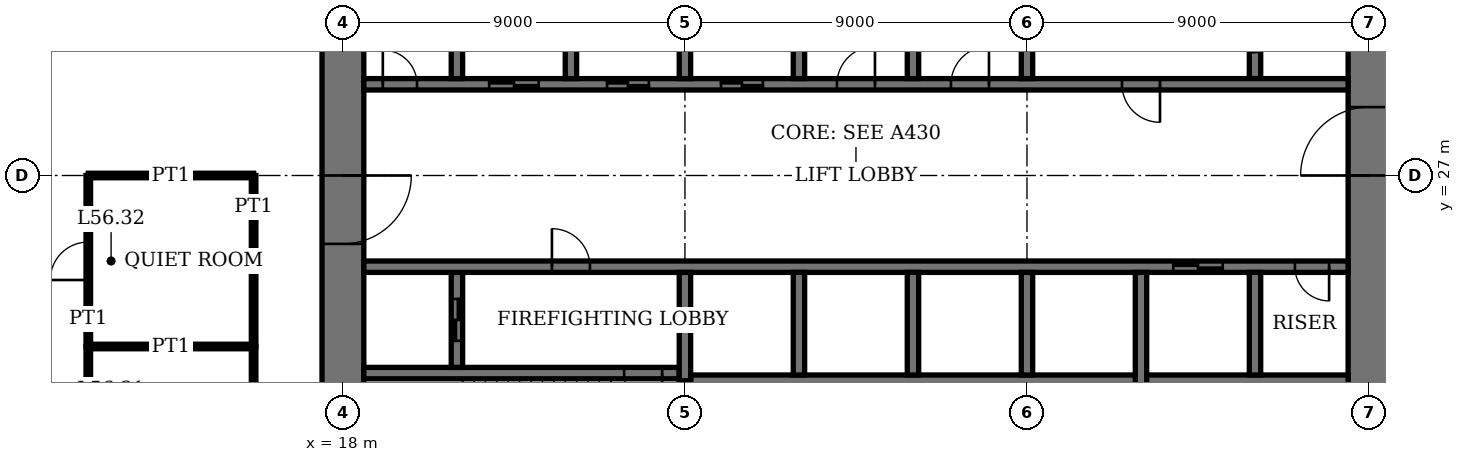
"""IFC4 building model, lengths in metres.
Left out: names, types, materials, properties, quantities, classifications, styles, units other than length and angle.
Written with IfcOpenShell. Run it as: python <this file> out.ifc"""

import sys

from ifc_helpers import new_model, si_unit, direction, frame, frame_2d, origin, place, context, subcontext, project, spatial, rectangle, extrude, element, fill, save


model = new_model("IFC4")
c1 = context("Model", 3, precision=1e-05, world=origin(), true_north=direction((0.0, 1.0)))
c2 = subcontext(c1, "Body", "Model", "MODEL_VIEW")
j1 = project(units=[si_unit("LENGTHUNIT", "METRE"), si_unit("PLANEANGLEUNIT", "RADIAN")], contexts=[c1])
p1 = place(None, origin())
s1 = spatial("IfcSite", under=j1, at=p1, CompositionType="ELEMENT")
p2 = place(p1, origin())
s2 = spatial("IfcBuilding", under=s1, at=p2, CompositionType="ELEMENT")
p3 = place(p2, frame((0.0, 0.0, 230.2)))
s3 = spatial("IfcBuildingStorey", under=s2, at=p3, CompositionType="ELEMENT", Elevation=230.2)
p4 = place(p3, frame((18.0, 35.45, 0.0), z_axis=(0.0, 0.0, 1.0), x_axis=(0.0, -1.0, 0.0)))
e1 = element("IfcWall", 1, at=p4, inside=s3, PredefinedType="SHEAR", context=c2, shape_type="SweptSolid", body=[
    extrude(rectangle(XDim=16.9, YDim=1.1, at=frame_2d((8.45, 0.0))), origin(), (0.0, 0.0, 1.0), 4.2),
])
p5 = place(p4, frame((8.45, 0.0, 0.0)))
e2 = element("IfcOpeningElement", 2, at=p5, cuts=e1, PredefinedType="OPENING", context=c2, shape_type="SweptSolid", body=[
    extrude(rectangle(XDim=1.8, YDim=2.4, at=frame_2d((0.9, 1.2))), frame((0.0, 0.56, 0.0), z_axis=(0.0, -1.0, 0.0), x_axis=(1.0, 0.0, 0.0)), (0.0, 0.0, 1.0), 1.12),
])
p6 = place(p3, frame((45.0, 18.55, 0.0), z_axis=(0.0, 0.0, 1.0), x_axis=(0.0, 1.0, 0.0)))
e3 = element("IfcWall", 3, at=p6, inside=s3, PredefinedType="SHEAR", context=c2, shape_type="SweptSolid", body=[
    extrude(rectangle(XDim=16.9, YDim=1.1, at=frame_2d((8.45, 0.0))), origin(), (0.0, 0.0, 1.0), 4.2),
])
p7 = place(p6, frame((8.45, 0.0, 0.0)))
e4 = element("IfcOpeningElement", 4, at=p7, cuts=e3, PredefinedType="OPENING", context=c2, shape_type="SweptSolid", body=[
    extrude(rectangle(XDim=1.8, YDim=2.4, at=frame_2d((0.9, 1.2))), frame((0.0, 0.56, 0.0), z_axis=(0.0, -1.0, 0.0), x_axis=(1.0, 0.0, 0.0)), (0.0, 0.0, 1.0), 1.12),
])
p8 = place(p3, frame((18.55, 21.8, 0.0), z_axis=(0.0, 0.0, 1.0), x_axis=(1.0, 0.0, 0.0)))
e5 = element("IfcWall", 5, at=p8, inside=s3, PredefinedType="SHEAR", context=c2, shape_type="SweptSolid", body=[
    extrude(rectangle(XDim=8.3, YDim=0.3, at=frame_2d((4.15, 0.0))), origin(), (0.0, 0.0, 1.0), 4.2),
])
p9 = place(p8, frame((6.85, 0.0, 0.0)))
e6 = element("IfcOpeningElement", 6, at=p9, cuts=e5, PredefinedType="OPENING", context=c2, shape_type="SweptSolid", body=[
    extrude(rectangle(XDim=1.0, YDim=2.4, at=frame_2d((0.5, 1.2))), frame((0.0, 0.16, 0.0), z_axis=(0.0, -1.0, 0.0), x_axis=(1.0, 0.0, 0.0)), (0.0, 0.0, 1.0), 0.32),
])
p10 = place(p3, frame((27.0, 18.55, 0.0), z_axis=(0.0, 0.0, 1.0), x_axis=(0.0, 1.0, 0.0)))
e7 = element("IfcWall", 7, at=p10, inside=s3, PredefinedType="SHEAR", context=c2, shape_type="SweptSolid", body=[
    extrude(rectangle(XDim=3.05, YDim=0.3, at=frame_2d((1.525, 0.0))), origin(), (0.0, 0.0, 1.0), 4.2),
])
p11 = place(p3, frame((21.0, 21.95, 0.0), z_axis=(0.0, 0.0, 1.0), x_axis=(0.0, 1.0, 0.0)))
e8 = element("IfcWall", 8, at=p11, inside=s3, PredefinedType="SHEAR", context=c2, shape_type="SweptSolid", body=[
    extrude(rectangle(XDim=2.5, YDim=0.3, at=frame_2d((1.25, 0.0))), origin(), (0.0, 0.0, 1.0), 4.2),
])
p12 = place(p11, frame((0.7, 0.0, 0.0)))
e9 = element("IfcOpeningElement", 9, at=p12, cuts=e8, PredefinedType="OPENING", context=c2, shape_type="SweptSolid", body=[
    extrude(rectangle(XDim=1.1, YDim=2.4, at=frame_2d((0.55, 1.2))), frame((0.0, 0.16, 0.0), z_axis=(0.0, -1.0, 0.0), x_axis=(1.0, 0.0, 0.0)), (0.0, 0.0, 1.0), 0.32),
])
p13 = place(p3, frame((42.0, 29.55, 0.0), z_axis=(0.0, 0.0, 1.0), x_axis=(0.0, 1.0, 0.0)))
e10 = element("IfcWall", 10, at=p13, inside=s3, PredefinedType="SHEAR", context=c2, shape_type="SweptSolid", body=[
    extrude(rectangle(XDim=2.5, YDim=0.3, at=frame_2d((1.25, 0.0))), origin(), (0.0, 0.0, 1.0), 4.2),
])
p14 = place(p13, frame((0.7, 0.0, 0.0)))
e11 = element("IfcOpeningElement", 11, at=p14, cuts=e10, PredefinedType="OPENING", context=c2, shape_type="SweptSolid", body=[
    extrude(rectangle(XDim=1.1, YDim=2.4, at=frame_2d((0.55, 1.2))), frame((0.0, 0.16, 0.0), z_axis=(0.0, -1.0, 0.0), x_axis=(1.0, 0.0, 0.0)), (0.0, 0.0, 1.0), 0.32),
])
p15 = place(p3, frame((18.55, 24.6, 0.0), z_axis=(0.0, 0.0, 1.0), x_axis=(1.0, 0.0, 0.0)))
e12 = element("IfcWall", 12, at=p15, inside=s3, PredefinedType="SHEAR", context=c2, shape_type="SweptSolid", body=[
    extrude(rectangle(XDim=25.9, YDim=0.3, at=frame_2d((12.95, 0.0))), origin(), (0.0, 0.0, 1.0), 4.2),
])
p16 = place(p15, frame((4.95, 0.0, 0.0)))
e13 = element("IfcOpeningElement", 13, at=p16, cuts=e12, PredefinedType="OPENING", context=c2, shape_type="SweptSolid", body=[
    extrude(rectangle(XDim=1.0, YDim=2.4, at=frame_2d((0.5, 1.2))), frame((0.0, 0.16, 0.0), z_axis=(0.0, -1.0, 0.0), x_axis=(1.0, 0.0, 0.0)), (0.0, 0.0, 1.0), 0.32),
])
p17 = place(p15, frame((24.5, 0.0, 0.0)))
e14 = element("IfcOpeningElement", 14, at=p17, cuts=e12, PredefinedType="OPENING", context=c2, shape_type="SweptSolid", body=[
    extrude(rectangle(XDim=0.9, YDim=2.1, at=frame_2d((0.45, 1.05))), frame((0.0, 0.16, 0.0), z_axis=(0.0, -1.0, 0.0), x_axis=(1.0, 0.0, 0.0)), (0.0, 0.0, 1.0), 0.32),
])
p18 = place(p15, frame((21.3, 0.0, 0.0)))
e15 = element("IfcOpeningElement", 15, at=p18, cuts=e12, PredefinedType="OPENING", context=c2, shape_type="SweptSolid", body=[
    extrude(rectangle(XDim=1.3, YDim=2.4, at=frame_2d((0.65, 1.2))), frame((0.0, 0.16, 0.0), z_axis=(0.0, -1.0, 0.0), x_axis=(1.0, 0.0, 0.0)), (0.0, 0.0, 1.0), 0.32),
])
p19 = place(p3, frame((18.55, 29.4, 0.0), z_axis=(0.0, 0.0, 1.0), x_axis=(1.0, 0.0, 0.0)))
e16 = element("IfcWall", 16, at=p19, inside=s3, PredefinedType="SHEAR", context=c2, shape_type="SweptSolid", body=[
    extrude(rectangle(XDim=25.9, YDim=0.3, at=frame_2d((12.95, 0.0))), origin(), (0.0, 0.0, 1.0), 4.2),
])
p20 = place(p19, frame((19.95, 0.0, 0.0)))
e17 = element("IfcOpeningElement", 17, at=p20, cuts=e16, PredefinedType="OPENING", context=c2, shape_type="SweptSolid", body=[
    extrude(rectangle(XDim=1.0, YDim=2.4, at=frame_2d((0.5, 1.2))), frame((0.0, 0.16, 0.0), z_axis=(0.0, -1.0, 0.0), x_axis=(1.0, 0.0, 0.0)), (0.0, 0.0, 1.0), 0.32),
])
p21 = place(p19, frame((0.5, 0.0, 0.0)))
e18 = element("IfcOpeningElement", 18, at=p21, cuts=e16, PredefinedType="OPENING", context=c2, shape_type="SweptSolid", body=[
    extrude(rectangle(XDim=0.9, YDim=2.1, at=frame_2d((0.45, 1.05))), frame((0.0, 0.16, 0.0), z_axis=(0.0, -1.0, 0.0), x_axis=(1.0, 0.0, 0.0)), (0.0, 0.0, 1.0), 0.32),
])
p22 = place(p19, frame((15.45, 0.0, 0.0)))
e19 = element("IfcOpeningElement", 19, at=p22, cuts=e16, PredefinedType="OPENING", context=c2, shape_type="SweptSolid", body=[
    extrude(rectangle(XDim=1.0, YDim=2.4, at=frame_2d((0.5, 1.2))), frame((0.0, 0.16, 0.0), z_axis=(0.0, -1.0, 0.0), x_axis=(1.0, 0.0, 0.0)), (0.0, 0.0, 1.0), 0.32),
])
p23 = place(p19, frame((12.45, 0.0, 0.0)))
e20 = element("IfcOpeningElement", 20, at=p23, cuts=e16, PredefinedType="OPENING", context=c2, shape_type="SweptSolid", body=[
    extrude(rectangle(XDim=1.0, YDim=2.4, at=frame_2d((0.5, 1.2))), frame((0.0, 0.16, 0.0), z_axis=(0.0, -1.0, 0.0), x_axis=(1.0, 0.0, 0.0)), (0.0, 0.0, 1.0), 0.32),
])
p24 = place(p19, frame((9.4, 0.0, 0.0)))
e21 = element("IfcOpeningElement", 21, at=p24, cuts=e16, PredefinedType="OPENING", context=c2, shape_type="SweptSolid", body=[
    extrude(rectangle(XDim=1.1, YDim=2.4, at=frame_2d((0.55, 1.2))), frame((0.0, 0.16, 0.0), z_axis=(0.0, -1.0, 0.0), x_axis=(1.0, 0.0, 0.0)), (0.0, 0.0, 1.0), 0.32),
])
p25 = place(p19, frame((6.4, 0.0, 0.0)))
e22 = element("IfcOpeningElement", 22, at=p25, cuts=e16, PredefinedType="OPENING", context=c2, shape_type="SweptSolid", body=[
    extrude(rectangle(XDim=1.1, YDim=2.4, at=frame_2d((0.55, 1.2))), frame((0.0, 0.16, 0.0), z_axis=(0.0, -1.0, 0.0), x_axis=(1.0, 0.0, 0.0)), (0.0, 0.0, 1.0), 0.32),
])
p26 = place(p19, frame((3.3, 0.0, 0.0)))
e23 = element("IfcOpeningElement", 23, at=p26, cuts=e16, PredefinedType="OPENING", context=c2, shape_type="SweptSolid", body=[
    extrude(rectangle(XDim=1.3, YDim=2.4, at=frame_2d((0.65, 1.2))), frame((0.0, 0.16, 0.0), z_axis=(0.0, -1.0, 0.0), x_axis=(1.0, 0.0, 0.0)), (0.0, 0.0, 1.0), 0.32),
])
p27 = place(p3, frame((27.15, 21.6, 0.0), z_axis=(0.0, 0.0, 1.0), x_axis=(1.0, 0.0, 0.0)))
e24 = element("IfcWall", 24, at=p27, inside=s3, PredefinedType="SHEAR", context=c2, shape_type="SweptSolid", body=[
    extrude(rectangle(XDim=17.3, YDim=0.3, at=frame_2d((8.65, 0.0))), origin(), (0.0, 0.0, 1.0), 4.2),
])
for number, where, z_axis, x_axis in (
    (25, (30.0, 21.75, 0.0), (0.0, 0.0, 1.0), (0.0, 1.0, 0.0)),
    (26, (33.0, 29.55, 0.0), (0.0, 0.0, 1.0), (0.0, 1.0, 0.0)),
    (27, (33.0, 21.75, 0.0), (0.0, 0.0, 1.0), (0.0, 1.0, 0.0)),
    (28, (30.0, 29.55, 0.0), (0.0, 0.0, 1.0), (0.0, 1.0, 0.0)),
    (29, (36.0, 21.75, 0.0), (0.0, 0.0, 1.0), (0.0, 1.0, 0.0)),
    (30, (27.0, 29.55, 0.0), (0.0, 0.0, 1.0), (0.0, 1.0, 0.0)),
):
    element("IfcWall", number, at=place(p3, frame(where, z_axis=z_axis, x_axis=x_axis)), inside=s3, PredefinedType="SHEAR", context=c2, shape_type="SweptSolid", body=[
        extrude(rectangle(XDim=2.7, YDim=0.3, at=frame_2d((1.35, 0.0))), origin(), (0.0, 0.0, 1.0), 4.2),
    ])
for number, where, z_axis, x_axis in (
    (31, (39.0, 18.55, 0.0), (0.0, 0.0, 1.0), (0.0, 1.0, 0.0)),
    (32, (24.0, 29.55, 0.0), (0.0, 0.0, 1.0), (0.0, 1.0, 0.0)),
):
    element("IfcWall", number, at=place(p3, frame(where, z_axis=z_axis, x_axis=x_axis)), inside=s3, PredefinedType="SHEAR", context=c2, shape_type="SweptSolid", body=[
        extrude(rectangle(XDim=5.9, YDim=0.3, at=frame_2d((2.95, 0.0))), origin(), (0.0, 0.0, 1.0), 4.2),
    ])
for number, where, z_axis, x_axis in (
    (33, (42.0, 21.75, 0.0), (0.0, 0.0, 1.0), (0.0, 1.0, 0.0)),
    (34, (21.0, 29.55, 0.0), (0.0, 0.0, 1.0), (0.0, 1.0, 0.0)),
):
    element("IfcWall", number, at=place(p3, frame(where, z_axis=z_axis, x_axis=x_axis)), inside=s3, PredefinedType="SHEAR", context=c2, shape_type="SweptSolid", body=[
        extrude(rectangle(XDim=2.7, YDim=0.3, at=frame_2d((1.35, 0.0))), origin(), (0.0, 0.0, 1.0), 4.2),
    ])
for number, where, z_axis, x_axis in (
    (35, (27.0, 21.6, 0.0), (0.0, 0.0, 1.0), (0.0, 1.0, 0.0)),
    (36, (36.0, 29.55, 0.0), (0.0, 0.0, 1.0), (0.0, 1.0, 0.0)),
):
    element("IfcWall", number, at=place(p3, frame(where, z_axis=z_axis, x_axis=x_axis)), inside=s3, PredefinedType="SHEAR", context=c2, shape_type="SweptSolid", body=[
        extrude(rectangle(XDim=2.85, YDim=0.3, at=frame_2d((1.425, 0.0))), origin(), (0.0, 0.0, 1.0), 4.2),
    ])
p28 = place(p3, frame((11.3, 22.5, 0.0), z_axis=(0.0, 0.0, 1.0), x_axis=(1.0, 0.0, 0.0)))
e37 = element("IfcWall", 37, at=p28, inside=s3, PredefinedType="PARTITIONING", context=c2, shape_type="SweptSolid", body=[
    extrude(rectangle(XDim=4.35, YDim=0.12, at=frame_2d((2.175, 0.0))), origin(), (0.0, 0.0, 1.0), 3.15),
])
p29 = place(p3, frame((11.3, 27.0, 0.0), z_axis=(0.0, 0.0, 1.0), x_axis=(1.0, 0.0, 0.0)))
e38 = element("IfcWall", 38, at=p29, inside=s3, PredefinedType="PARTITIONING", context=c2, shape_type="SweptSolid", body=[
    extrude(rectangle(XDim=4.35, YDim=0.12, at=frame_2d((2.175, 0.0))), origin(), (0.0, 0.0, 1.0), 3.25),
])
p30 = place(p3, frame((11.3, 18.0, 0.0), z_axis=(0.0, 0.0, 1.0), x_axis=(0.0, 1.0, 0.0)))
e39 = element("IfcWall", 39, at=p30, inside=s3, PredefinedType="PARTITIONING", context=c2, shape_type="SweptSolid", body=[
    extrude(rectangle(XDim=4.5, YDim=0.12, at=frame_2d((2.25, 0.0))), origin(), (0.0, 0.0, 1.0), 3.85),
])
p31 = place(p30, frame((1.75, 0.0, 0.0)))
e40 = element("IfcOpeningElement", 40, at=p31, cuts=e39, PredefinedType="OPENING", context=c2, shape_type="SweptSolid", body=[
    extrude(rectangle(XDim=1.0, YDim=2.4, at=frame_2d((0.5, 1.2))), frame((0.0, 0.07, 0.0), z_axis=(0.0, -1.0, 0.0), x_axis=(1.0, 0.0, 0.0)), (0.0, 0.0, 1.0), 0.14),
])
p32 = place(p3, frame((11.3, 22.5, 0.0), z_axis=(0.0, 0.0, 1.0), x_axis=(0.0, 1.0, 0.0)))
e41 = element("IfcWall", 41, at=p32, inside=s3, PredefinedType="PARTITIONING", context=c2, shape_type="SweptSolid", body=[
    extrude(rectangle(XDim=4.5, YDim=0.12, at=frame_2d((2.25, 0.0))), origin(), (0.0, 0.0, 1.0), 3.85),
])
p33 = place(p32, frame((1.75, 0.0, 0.0)))
e42 = element("IfcOpeningElement", 42, at=p33, cuts=e41, PredefinedType="OPENING", context=c2, shape_type="SweptSolid", body=[
    extrude(rectangle(XDim=1.0, YDim=2.4, at=frame_2d((0.5, 1.2))), frame((0.0, 0.07, 0.0), z_axis=(0.0, -1.0, 0.0), x_axis=(1.0, 0.0, 0.0)), (0.0, 0.0, 1.0), 0.14),
])
for number, where, z_axis, x_axis in (
    (43, (15.65, 18.0, 0.0), (0.0, 0.0, 1.0), (0.0, 1.0, 0.0)),
    (44, (15.65, 22.5, 0.0), (0.0, 0.0, 1.0), (0.0, 1.0, 0.0)),
):
    element("IfcWall", number, at=place(p3, frame(where, z_axis=z_axis, x_axis=x_axis)), inside=s3, PredefinedType="PARTITIONING", context=c2, shape_type="SweptSolid", body=[
        extrude(rectangle(XDim=4.5, YDim=0.12, at=frame_2d((2.25, 0.0))), origin(), (0.0, 0.0, 1.0), 3.85),
    ])
p34 = place(p5, origin())
e45 = element("IfcDoor", 45, at=p34, inside=s3, OperationType="DOUBLE_DOOR_DOUBLE_SWING", PredefinedType="DOOR", context=c2, shape_type="SweptSolid", body=[
    extrude(rectangle(XDim=1.8, YDim=2.4, at=frame_2d((0.9, 1.2))), frame((0.0, 0.03, 0.0), z_axis=(0.0, -1.0, 0.0), x_axis=(1.0, 0.0, 0.0)), (0.0, 0.0, 1.0), 0.06),
    extrude(rectangle(XDim=0.04, YDim=2.4, at=frame_2d((0.02, 1.2))), frame((0.0, 0.55, 0.0), z_axis=(0.0, -1.0, 0.0), x_axis=(1.0, 0.0, 0.0)), (0.0, 0.0, 1.0), 1.1),
    extrude(rectangle(XDim=0.04, YDim=2.4, at=frame_2d((1.78, 1.2))), frame((0.0, 0.55, 0.0), z_axis=(0.0, -1.0, 0.0), x_axis=(1.0, 0.0, 0.0)), (0.0, 0.0, 1.0), 1.1),
    extrude(rectangle(XDim=1.8, YDim=0.04, at=frame_2d((0.9, 2.38))), frame((0.0, 0.55, 0.0), z_axis=(0.0, -1.0, 0.0), x_axis=(1.0, 0.0, 0.0)), (0.0, 0.0, 1.0), 1.1),
])
fill(e2, e45)
p35 = place(p7, origin())
e46 = element("IfcDoor", 46, at=p35, inside=s3, OperationType="DOUBLE_DOOR_DOUBLE_SWING", PredefinedType="DOOR", context=c2, shape_type="SweptSolid", body=[
    extrude(rectangle(XDim=1.8, YDim=2.4, at=frame_2d((0.9, 1.2))), frame((0.0, 0.03, 0.0), z_axis=(0.0, -1.0, 0.0), x_axis=(1.0, 0.0, 0.0)), (0.0, 0.0, 1.0), 0.06),
    extrude(rectangle(XDim=0.04, YDim=2.4, at=frame_2d((0.02, 1.2))), frame((0.0, 0.55, 0.0), z_axis=(0.0, -1.0, 0.0), x_axis=(1.0, 0.0, 0.0)), (0.0, 0.0, 1.0), 1.1),
    extrude(rectangle(XDim=0.04, YDim=2.4, at=frame_2d((1.78, 1.2))), frame((0.0, 0.55, 0.0), z_axis=(0.0, -1.0, 0.0), x_axis=(1.0, 0.0, 0.0)), (0.0, 0.0, 1.0), 1.1),
    extrude(rectangle(XDim=1.8, YDim=0.04, at=frame_2d((0.9, 2.38))), frame((0.0, 0.55, 0.0), z_axis=(0.0, -1.0, 0.0), x_axis=(1.0, 0.0, 0.0)), (0.0, 0.0, 1.0), 1.1),
])
fill(e4, e46)
p36 = place(p9, origin())
e47 = element("IfcDoor", 47, at=p36, inside=s3, OperationType="SINGLE_SWING_RIGHT", PredefinedType="DOOR", context=c2, shape_type="SweptSolid", body=[
    extrude(rectangle(XDim=1.0, YDim=2.4, at=frame_2d((0.5, 1.2))), frame((0.0, 0.03, 0.0), z_axis=(0.0, -1.0, 0.0), x_axis=(1.0, 0.0, 0.0)), (0.0, 0.0, 1.0), 0.06),
])
fill(e6, e47)
p37 = place(p16, origin())
e48 = element("IfcDoor", 48, at=p37, inside=s3, OperationType="SINGLE_SWING_RIGHT", PredefinedType="DOOR", context=c2, shape_type="SweptSolid", body=[
    extrude(rectangle(XDim=1.0, YDim=2.4, at=frame_2d((0.5, 1.2))), frame((0.0, 0.03, 0.0), z_axis=(0.0, -1.0, 0.0), x_axis=(1.0, 0.0, 0.0)), (0.0, 0.0, 1.0), 0.06),
])
fill(e13, e48)
p38 = place(p20, origin())
e49 = element("IfcDoor", 49, at=p38, inside=s3, OperationType="SINGLE_SWING_RIGHT", PredefinedType="DOOR", context=c2, shape_type="SweptSolid", body=[
    extrude(rectangle(XDim=1.0, YDim=2.4, at=frame_2d((0.5, 1.2))), frame((0.0, 0.03, 0.0), z_axis=(0.0, -1.0, 0.0), x_axis=(1.0, 0.0, 0.0)), (0.0, 0.0, 1.0), 0.06),
])
fill(e17, e49)
p39 = place(p17, origin())
e50 = element("IfcDoor", 50, at=p39, inside=s3, OperationType="SINGLE_SWING_RIGHT", PredefinedType="DOOR", context=c2, shape_type="SweptSolid", body=[
    extrude(rectangle(XDim=0.9, YDim=2.1, at=frame_2d((0.45, 1.05))), frame((0.0, 0.03, 0.0), z_axis=(0.0, -1.0, 0.0), x_axis=(1.0, 0.0, 0.0)), (0.0, 0.0, 1.0), 0.06),
])
fill(e14, e50)
p40 = place(p21, origin())
e51 = element("IfcDoor", 51, at=p40, inside=s3, OperationType="SINGLE_SWING_RIGHT", PredefinedType="DOOR", context=c2, shape_type="SweptSolid", body=[
    extrude(rectangle(XDim=0.9, YDim=2.1, at=frame_2d((0.45, 1.05))), frame((0.0, 0.03, 0.0), z_axis=(0.0, -1.0, 0.0), x_axis=(1.0, 0.0, 0.0)), (0.0, 0.0, 1.0), 0.06),
])
fill(e18, e51)
p41 = place(p33, origin())
e52 = element("IfcDoor", 52, at=p41, inside=s3, OperationType="SINGLE_SWING_RIGHT", PredefinedType="DOOR", context=c2, shape_type="SweptSolid", body=[
    extrude(rectangle(XDim=1.0, YDim=2.4, at=frame_2d((0.5, 1.2))), frame((0.0, 0.025, 0.0), z_axis=(0.0, -1.0, 0.0), x_axis=(1.0, 0.0, 0.0)), (0.0, 0.0, 1.0), 0.05),
])
fill(e42, e52)
p42 = place(p22, origin())
e53 = element("IfcDoor", 53, at=p42, inside=s3, OperationType="SINGLE_SWING_LEFT", PredefinedType="DOOR", context=c2, shape_type="SweptSolid", body=[
    extrude(rectangle(XDim=1.0, YDim=2.4, at=frame_2d((0.5, 1.2))), frame((0.0, 0.03, 0.0), z_axis=(0.0, -1.0, 0.0), x_axis=(1.0, 0.0, 0.0)), (0.0, 0.0, 1.0), 0.06),
])
fill(e19, e53)
p43 = place(p23, origin())
e54 = element("IfcDoor", 54, at=p43, inside=s3, OperationType="SINGLE_SWING_LEFT", PredefinedType="DOOR", context=c2, shape_type="SweptSolid", body=[
    extrude(rectangle(XDim=1.0, YDim=2.4, at=frame_2d((0.5, 1.2))), frame((0.0, 0.03, 0.0), z_axis=(0.0, -1.0, 0.0), x_axis=(1.0, 0.0, 0.0)), (0.0, 0.0, 1.0), 0.06),
])
fill(e20, e54)
p44 = place(p24, origin())
e55 = element("IfcDoor", 55, at=p44, inside=s3, OperationType="DOUBLE_DOOR_SLIDING", PredefinedType="DOOR", context=c2, shape_type="SweptSolid", body=[
    extrude(rectangle(XDim=1.1, YDim=2.4, at=frame_2d((0.55, 1.2))), frame((0.0, 0.02, 0.0), z_axis=(0.0, -1.0, 0.0), x_axis=(1.0, 0.0, 0.0)), (0.0, 0.0, 1.0), 0.04),
])
fill(e21, e55)
p45 = place(p25, origin())
e56 = element("IfcDoor", 56, at=p45, inside=s3, OperationType="DOUBLE_DOOR_SLIDING", PredefinedType="DOOR", context=c2, shape_type="SweptSolid", body=[
    extrude(rectangle(XDim=1.1, YDim=2.4, at=frame_2d((0.55, 1.2))), frame((0.0, 0.02, 0.0), z_axis=(0.0, -1.0, 0.0), x_axis=(1.0, 0.0, 0.0)), (0.0, 0.0, 1.0), 0.04),
])
fill(e22, e56)
p46 = place(p18, origin())
e57 = element("IfcDoor", 57, at=p46, inside=s3, OperationType="DOUBLE_DOOR_SLIDING", PredefinedType="DOOR", context=c2, shape_type="SweptSolid", body=[
    extrude(rectangle(XDim=1.3, YDim=2.4, at=frame_2d((0.65, 1.2))), frame((0.0, 0.02, 0.0), z_axis=(0.0, -1.0, 0.0), x_axis=(1.0, 0.0, 0.0)), (0.0, 0.0, 1.0), 0.04),
])
fill(e15, e57)
p47 = place(p26, origin())
e58 = element("IfcDoor", 58, at=p47, inside=s3, OperationType="DOUBLE_DOOR_SLIDING", PredefinedType="DOOR", context=c2, shape_type="SweptSolid", body=[
    extrude(rectangle(XDim=1.3, YDim=2.4, at=frame_2d((0.65, 1.2))), frame((0.0, 0.02, 0.0), z_axis=(0.0, -1.0, 0.0), x_axis=(1.0, 0.0, 0.0)), (0.0, 0.0, 1.0), 0.04),
])
fill(e23, e58)
p48 = place(p12, origin())
e59 = element("IfcDoor", 59, at=p48, inside=s3, OperationType="DOUBLE_DOOR_SLIDING", PredefinedType="DOOR", context=c2, shape_type="SweptSolid", body=[
    extrude(rectangle(XDim=1.1, YDim=2.4, at=frame_2d((0.55, 1.2))), frame((0.0, 0.03, 0.0), z_axis=(0.0, -1.0, 0.0), x_axis=(1.0, 0.0, 0.0)), (0.0, 0.0, 1.0), 0.06),
])
fill(e9, e59)
save(model, sys.argv[1])
